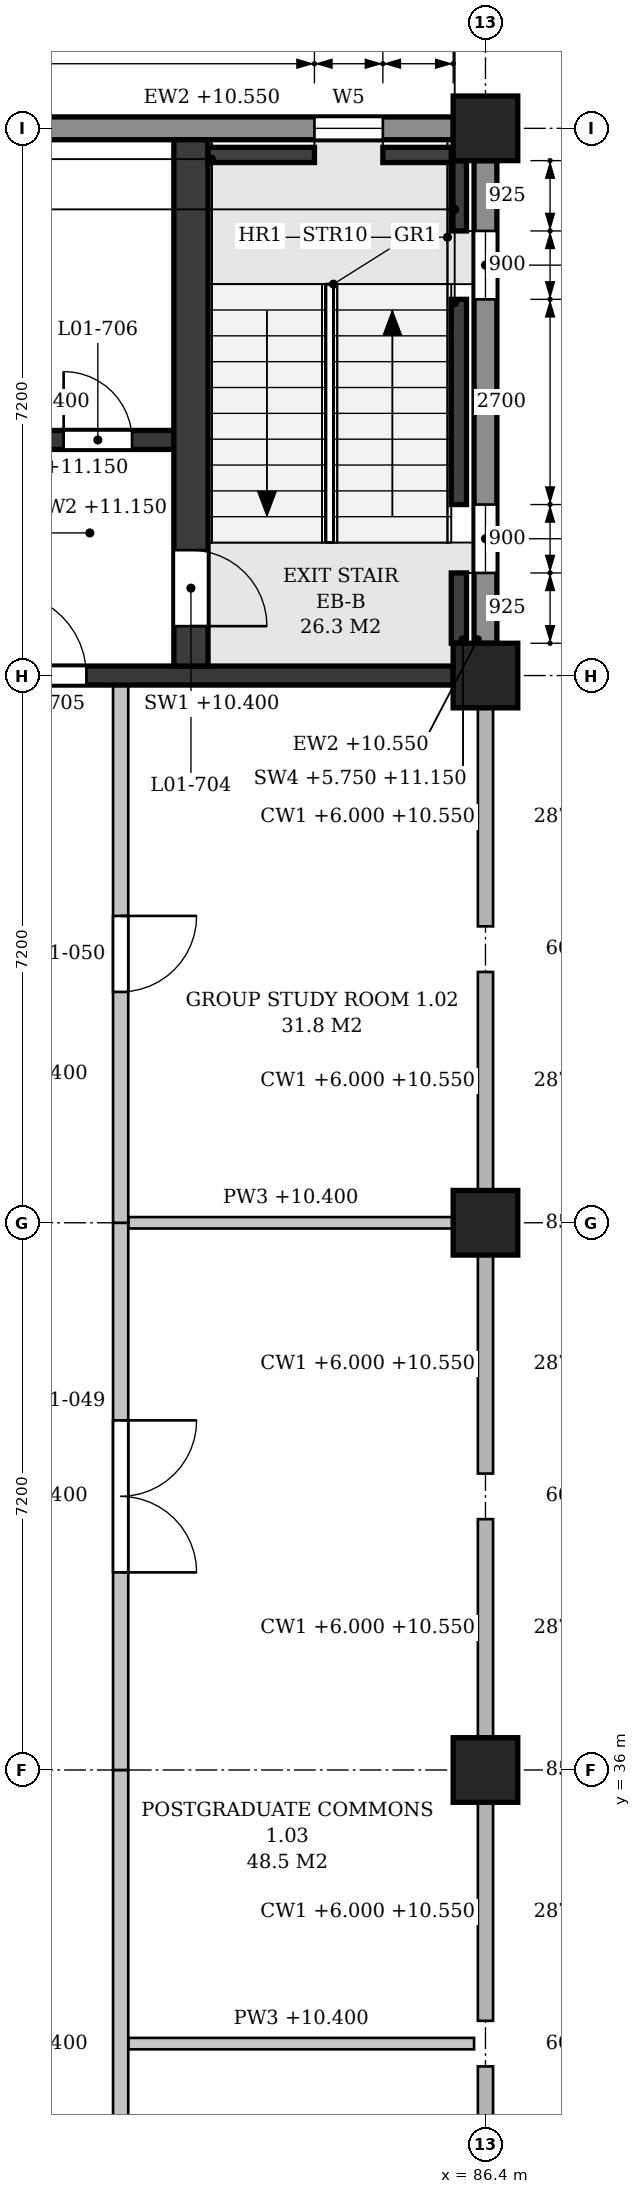
"""IFC4 building model, lengths in metres.
Left out: names, types, materials, properties, quantities, classifications, styles, units other than length and angle.
Written with IfcOpenShell. Run it as: python <this file> out.ifc"""

import sys

from ifc_helpers import new_model, si_unit, direction, frame, frame_2d, origin, origin_2d, place, context, subcontext, project, spatial, polyline, rectangle, outline, extrude, element, fill, save


model = new_model("IFC4")
c1 = context("Model", 3, precision=1e-05, world=origin(), true_north=direction((0.0, 1.0)))
c2 = subcontext(c1, "Body", "Model", "MODEL_VIEW")
j1 = project(units=[si_unit("LENGTHUNIT", "METRE"), si_unit("PLANEANGLEUNIT", "RADIAN")], contexts=[c1])
p1 = place(None, origin())
s1 = spatial("IfcSite", under=j1, at=p1, CompositionType="ELEMENT")
p2 = place(p1, origin())
s2 = spatial("IfcBuilding", under=s1, at=p2, CompositionType="ELEMENT")
p3 = place(p2, frame((0.0, 0.0, 6.0)))
s3 = spatial("IfcBuildingStorey", under=s2, at=p3, CompositionType="ELEMENT", Elevation=6.0)
for number, where, z_axis, x_axis in (
    (1, (86.4, 36.0, 0.0), (0.0, 0.0, 1.0), (1.0, 0.0, 0.0)),
    (2, (86.4, 43.2, 0.0), (0.0, 0.0, 1.0), (1.0, 0.0, 0.0)),
    (3, (86.4, 50.4, 0.0), (0.0, 0.0, 1.0), (1.0, 0.0, 0.0)),
    (4, (86.4, 57.6, 0.0), (0.0, 0.0, 1.0), (1.0, 0.0, 0.0)),
):
    element("IfcColumn", number, at=place(p3, frame(where, z_axis=z_axis, x_axis=x_axis)), inside=s3, PredefinedType="COLUMN", context=c2, shape_type="SweptSolid", body=[
        extrude(rectangle(XDim=0.85, YDim=0.85, at=origin_2d()), origin(), (0.0, 0.0, 1.0), 5.4),
    ])
p4 = place(p3, frame((86.4, 50.825, 0.0), z_axis=(0.0, 0.0, 1.0), x_axis=(0.0, 1.0, 0.0)))
e5 = element("IfcWall", 5, at=p4, inside=s3, PredefinedType="STANDARD", context=c2, shape_type="SweptSolid", body=[
    extrude(rectangle(XDim=6.35, YDim=0.3, at=frame_2d((3.175, 0.0))), origin(), (0.0, 0.0, 1.0), 4.55),
])
p5 = place(p4, frame((0.925, 0.0, 0.9)))
e6 = element("IfcOpeningElement", 6, at=p5, cuts=e5, PredefinedType="OPENING", context=c2, shape_type="SweptSolid", body=[
    extrude(outline(polyline([(0.0, 0.0), (0.9, 0.0), (0.9, 3.15), (0.45, 3.6), (0.0, 3.15), (0.0, 0.0)])), frame((0.0, 0.16, 0.0), z_axis=(0.0, -1.0, 0.0), x_axis=(1.0, 0.0, 0.0)), (0.0, 0.0, 1.0), 0.32),
])
p6 = place(p4, frame((4.525, 0.0, 0.9)))
e7 = element("IfcOpeningElement", 7, at=p6, cuts=e5, PredefinedType="OPENING", context=c2, shape_type="SweptSolid", body=[
    extrude(outline(polyline([(0.0, 0.0), (0.9, 0.0), (0.9, 3.15), (0.45, 3.6), (0.0, 3.15), (0.0, 0.0)])), frame((0.0, 0.16, 0.0), z_axis=(0.0, -1.0, 0.0), x_axis=(1.0, 0.0, 0.0)), (0.0, 0.0, 1.0), 0.32),
])
p7 = place(p3, frame((85.975, 57.6, 0.0), z_axis=(0.0, 0.0, 1.0), x_axis=(-1.0, 0.0, 0.0)))
e8 = element("IfcWall", 8, at=p7, inside=s3, PredefinedType="STANDARD", context=c2, shape_type="SweptSolid", body=[
    extrude(rectangle(XDim=6.35, YDim=0.3, at=frame_2d((3.175, 0.0))), origin(), (0.0, 0.0, 1.0), 4.55),
])
p8 = place(p7, frame((0.925, 0.0, 0.9)))
e9 = element("IfcOpeningElement", 9, at=p8, cuts=e8, PredefinedType="OPENING", context=c2, shape_type="SweptSolid", body=[
    extrude(outline(polyline([(0.0, 0.0), (0.9, 0.0), (0.9, 3.15), (0.45, 3.6), (0.0, 3.15), (0.0, 0.0)])), frame((0.0, 0.16, 0.0), z_axis=(0.0, -1.0, 0.0), x_axis=(1.0, 0.0, 0.0)), (0.0, 0.0, 1.0), 0.32),
])
p9 = place(p3, frame((79.625, 50.4, 0.0), z_axis=(0.0, 0.0, 1.0), x_axis=(1.0, 0.0, 0.0)))
e10 = element("IfcWall", 10, at=p9, inside=s3, PredefinedType="SHEAR", context=c2, shape_type="SweptSolid", body=[
    extrude(rectangle(XDim=6.35, YDim=0.25, at=frame_2d((3.175, 0.0))), origin(), (0.0, 0.0, 1.0), 4.4),
])
p10 = place(p9, frame((0.425, 0.0, 0.0)))
e11 = element("IfcOpeningElement", 11, at=p10, cuts=e10, PredefinedType="OPENING", context=c2, shape_type="SweptSolid", body=[
    extrude(rectangle(XDim=1.1, YDim=2.1, at=frame_2d((0.55, 1.05))), frame((0.0, 0.135, 0.0), z_axis=(0.0, -1.0, 0.0), x_axis=(1.0, 0.0, 0.0)), (0.0, 0.0, 1.0), 0.27),
])
p11 = place(p3, frame((86.05, 50.825, -0.25), z_axis=(0.0, 0.0, 1.0), x_axis=(0.0, 1.0, 0.0)))
e12 = element("IfcWall", 12, at=p11, inside=s3, PredefinedType="SHEAR", context=c2, shape_type="SweptSolid", body=[
    extrude(rectangle(XDim=0.925, YDim=0.2, at=frame_2d((0.462, 0.0))), origin(), (0.0, 0.0, 1.0), 5.4),
])
p12 = place(p3, frame((86.05, 52.65, -0.25), z_axis=(0.0, 0.0, 1.0), x_axis=(0.0, 1.0, 0.0)))
e13 = element("IfcWall", 13, at=p12, inside=s3, PredefinedType="SHEAR", context=c2, shape_type="SweptSolid", body=[
    extrude(rectangle(XDim=2.7, YDim=0.2, at=frame_2d((1.35, 0.0))), origin(), (0.0, 0.0, 1.0), 5.4),
])
p13 = place(p3, frame((86.05, 56.25, -0.25), z_axis=(0.0, 0.0, 1.0), x_axis=(0.0, 1.0, 0.0)))
e14 = element("IfcWall", 14, at=p13, inside=s3, PredefinedType="SHEAR", context=c2, shape_type="SweptSolid", body=[
    extrude(rectangle(XDim=0.925, YDim=0.2, at=frame_2d((0.462, 0.0))), origin(), (0.0, 0.0, 1.0), 5.4),
])
p14 = place(p3, frame((82.75, 57.25, -0.25), z_axis=(0.0, 0.0, 1.0), x_axis=(1.0, 0.0, 0.0)))
e15 = element("IfcWall", 15, at=p14, inside=s3, PredefinedType="SHEAR", context=c2, shape_type="SweptSolid", body=[
    extrude(rectangle(XDim=1.4, YDim=0.2, at=frame_2d((0.7, 0.0))), origin(), (0.0, 0.0, 1.0), 5.4),
])
p15 = place(p3, frame((85.05, 57.25, -0.25), z_axis=(0.0, 0.0, 1.0), x_axis=(1.0, 0.0, 0.0)))
e16 = element("IfcWall", 16, at=p15, inside=s3, PredefinedType="SHEAR", context=c2, shape_type="SweptSolid", body=[
    extrude(rectangle(XDim=0.9, YDim=0.2, at=frame_2d((0.45, 0.0))), origin(), (0.0, 0.0, 1.0), 5.4),
])
p16 = place(p3, frame((82.525, 50.525, 0.0), z_axis=(0.0, 0.0, 1.0), x_axis=(0.0, 1.0, 0.0)))
e17 = element("IfcWall", 17, at=p16, inside=s3, PredefinedType="SHEAR", context=c2, shape_type="SweptSolid", body=[
    extrude(rectangle(XDim=6.925, YDim=0.45, at=frame_2d((3.462, 0.0))), origin(), (0.0, 0.0, 1.0), 5.15),
])
p17 = place(p16, frame((0.525, 0.0, 0.0)))
e18 = element("IfcOpeningElement", 18, at=p17, cuts=e17, PredefinedType="OPENING", context=c2, shape_type="SweptSolid", body=[
    extrude(rectangle(XDim=1.0, YDim=2.1, at=frame_2d((0.5, 1.05))), frame((0.0, 0.235, 0.0), z_axis=(0.0, -1.0, 0.0), x_axis=(1.0, 0.0, 0.0)), (0.0, 0.0, 1.0), 0.47),
])
p18 = place(p3, frame((79.325, 53.5, 0.0), z_axis=(0.0, 0.0, 1.0), x_axis=(1.0, 0.0, 0.0)))
e19 = element("IfcWall", 19, at=p18, inside=s3, PredefinedType="SHEAR", context=c2, shape_type="SweptSolid", body=[
    extrude(rectangle(XDim=2.975, YDim=0.25, at=frame_2d((1.488, 0.0))), origin(), (0.0, 0.0, 1.0), 5.15),
])
p19 = place(p18, frame((1.525, 0.0, 0.0)))
e20 = element("IfcOpeningElement", 20, at=p19, cuts=e19, PredefinedType="OPENING", context=c2, shape_type="SweptSolid", body=[
    extrude(rectangle(XDim=0.9, YDim=2.1, at=frame_2d((0.45, 1.05))), frame((0.0, 0.135, 0.0), z_axis=(0.0, -1.0, 0.0), x_axis=(1.0, 0.0, 0.0)), (0.0, 0.0, 1.0), 0.27),
])
p20 = place(p3, frame((81.7, 32.4, 0.0), z_axis=(0.0, 0.0, 1.0), x_axis=(1.0, 0.0, 0.0)))
e21 = element("IfcWall", 21, at=p20, inside=s3, PredefinedType="PARTITIONING", context=c2, shape_type="SweptSolid", body=[
    extrude(rectangle(XDim=4.55, YDim=0.15, at=frame_2d((2.275, 0.0))), origin(), (0.0, 0.0, 1.0), 4.4),
])
p21 = place(p3, frame((81.7, 43.2, 0.0), z_axis=(0.0, 0.0, 1.0), x_axis=(1.0, 0.0, 0.0)))
e22 = element("IfcWall", 22, at=p21, inside=s3, PredefinedType="PARTITIONING", context=c2, shape_type="SweptSolid", body=[
    extrude(rectangle(XDim=4.275, YDim=0.15, at=frame_2d((2.138, 0.0))), origin(), (0.0, 0.0, 1.0), 4.4),
])
p22 = place(p3, frame((81.6, 28.8, 0.0), z_axis=(0.0, 0.0, 1.0), x_axis=(0.0, 1.0, 0.0)))
e23 = element("IfcWall", 23, at=p22, inside=s3, PredefinedType="PARTITIONING", context=c2, shape_type="SweptSolid", body=[
    extrude(outline(polyline([(0.0, 0.0), (7.2, 0.0), (7.2, 4.4), (6.95, 4.4), (6.95, 5.15), (0.25, 5.15), (0.25, 4.4), (0.0, 4.4), (0.0, 0.0)])), frame((0.0, 0.1, 0.0), z_axis=(0.0, -1.0, 0.0), x_axis=(1.0, 0.0, 0.0)), (0.0, 0.0, 1.0), 0.2),
])
p23 = place(p3, frame((81.6, 36.0, 0.0), z_axis=(0.0, 0.0, 1.0), x_axis=(0.0, 1.0, 0.0)))
e24 = element("IfcWall", 24, at=p23, inside=s3, PredefinedType="PARTITIONING", context=c2, shape_type="SweptSolid", body=[
    extrude(outline(polyline([(0.0, 0.0), (7.2, 0.0), (7.2, 4.4), (6.95, 4.4), (6.95, 5.15), (0.25, 5.15), (0.25, 4.4), (0.0, 4.4), (0.0, 0.0)])), frame((0.0, 0.1, 0.0), z_axis=(0.0, -1.0, 0.0), x_axis=(1.0, 0.0, 0.0)), (0.0, 0.0, 1.0), 0.2),
])
p24 = place(p23, frame((2.6, 0.0, 0.0)))
e25 = element("IfcOpeningElement", 25, at=p24, cuts=e24, PredefinedType="OPENING", context=c2, shape_type="SweptSolid", body=[
    extrude(rectangle(XDim=2.0, YDim=2.1, at=frame_2d((1.0, 1.05))), frame((0.0, 0.11, 0.0), z_axis=(0.0, -1.0, 0.0), x_axis=(1.0, 0.0, 0.0)), (0.0, 0.0, 1.0), 0.22),
])
p25 = place(p3, frame((81.6, 43.2, 0.0), z_axis=(0.0, 0.0, 1.0), x_axis=(0.0, 1.0, 0.0)))
e26 = element("IfcWall", 26, at=p25, inside=s3, PredefinedType="PARTITIONING", context=c2, shape_type="SweptSolid", body=[
    extrude(outline(polyline([(0.0, 0.0), (7.075, 0.0), (7.075, 4.4), (6.95, 4.4), (6.95, 5.15), (0.25, 5.15), (0.25, 4.4), (0.0, 4.4), (0.0, 0.0)])), frame((0.0, 0.1, 0.0), z_axis=(0.0, -1.0, 0.0), x_axis=(1.0, 0.0, 0.0)), (0.0, 0.0, 1.0), 0.2),
])
p26 = place(p25, frame((3.038, 0.0, 0.0)))
e27 = element("IfcOpeningElement", 27, at=p26, cuts=e26, PredefinedType="OPENING", context=c2, shape_type="SweptSolid", body=[
    extrude(rectangle(XDim=1.0, YDim=2.1, at=frame_2d((0.5, 1.05))), frame((0.0, 0.11, 0.0), z_axis=(0.0, -1.0, 0.0), x_axis=(1.0, 0.0, 0.0)), (0.0, 0.0, 1.0), 0.22),
])
p27 = place(p5, origin())
e28 = element("IfcWindow", 28, at=p27, inside=s3, PartitioningType="SINGLE_PANEL", PredefinedType="WINDOW", context=c2, shape_type="SweptSolid", body=[
    extrude(outline(polyline([(0.0, 0.0), (0.9, 0.0), (0.9, 3.15), (0.45, 3.6), (0.0, 3.15), (0.0, 0.0)])), frame((0.0, 0.03, 0.0), z_axis=(0.0, -1.0, 0.0), x_axis=(1.0, 0.0, 0.0)), (0.0, 0.0, 1.0), 0.06),
])
fill(e6, e28)
p28 = place(p6, origin())
e29 = element("IfcWindow", 29, at=p28, inside=s3, PartitioningType="SINGLE_PANEL", PredefinedType="WINDOW", context=c2, shape_type="SweptSolid", body=[
    extrude(outline(polyline([(0.0, 0.0), (0.9, 0.0), (0.9, 3.15), (0.45, 3.6), (0.0, 3.15), (0.0, 0.0)])), frame((0.0, 0.03, 0.0), z_axis=(0.0, -1.0, 0.0), x_axis=(1.0, 0.0, 0.0)), (0.0, 0.0, 1.0), 0.06),
])
fill(e7, e29)
p29 = place(p8, origin())
e30 = element("IfcWindow", 30, at=p29, inside=s3, PartitioningType="SINGLE_PANEL", PredefinedType="WINDOW", context=c2, shape_type="SweptSolid", body=[
    extrude(outline(polyline([(0.0, 0.0), (0.9, 0.0), (0.9, 3.15), (0.45, 3.6), (0.0, 3.15), (0.0, 0.0)])), frame((0.0, 0.03, 0.0), z_axis=(0.0, -1.0, 0.0), x_axis=(1.0, 0.0, 0.0)), (0.0, 0.0, 1.0), 0.06),
])
fill(e9, e30)
p30 = place(p17, frame((1.0, 0.0, 0.0), z_axis=(0.0, 0.0, 1.0), x_axis=(-1.0, 0.0, 0.0)))
e31 = element("IfcDoor", 31, at=p30, inside=s3, OperationType="SINGLE_SWING_RIGHT", PredefinedType="DOOR", context=c2, shape_type="SweptSolid", body=[
    extrude(rectangle(XDim=1.0, YDim=2.1, at=frame_2d((0.5, 1.05))), frame((0.0, 0.025, 0.0), z_axis=(0.0, -1.0, 0.0), x_axis=(1.0, 0.0, 0.0)), (0.0, 0.0, 1.0), 0.05),
])
fill(e18, e31)
p31 = place(p10, origin())
e32 = element("IfcDoor", 32, at=p31, inside=s3, OperationType="SINGLE_SWING_LEFT", PredefinedType="DOOR", context=c2, shape_type="SweptSolid", body=[
    extrude(rectangle(XDim=1.1, YDim=2.1, at=frame_2d((0.55, 1.05))), frame((0.0, 0.025, 0.0), z_axis=(0.0, -1.0, 0.0), x_axis=(1.0, 0.0, 0.0)), (0.0, 0.0, 1.0), 0.05),
])
fill(e11, e32)
p32 = place(p19, origin())
e33 = element("IfcDoor", 33, at=p32, inside=s3, OperationType="SINGLE_SWING_LEFT", PredefinedType="DOOR", context=c2, shape_type="SweptSolid", body=[
    extrude(rectangle(XDim=0.9, YDim=2.1, at=frame_2d((0.45, 1.05))), frame((0.0, 0.025, 0.0), z_axis=(0.0, -1.0, 0.0), x_axis=(1.0, 0.0, 0.0)), (0.0, 0.0, 1.0), 0.05),
])
fill(e20, e33)
p33 = place(p24, origin())
e34 = element("IfcDoor", 34, at=p33, inside=s3, OperationType="DOUBLE_DOOR_SINGLE_SWING", PredefinedType="DOOR", context=c2, shape_type="SweptSolid", body=[
    extrude(rectangle(XDim=2.0, YDim=2.1, at=frame_2d((1.0, 1.05))), frame((0.0, 0.025, 0.0), z_axis=(0.0, -1.0, 0.0), x_axis=(1.0, 0.0, 0.0)), (0.0, 0.0, 1.0), 0.05),
])
fill(e25, e34)
p34 = place(p26, frame((1.0, 0.0, 0.0), z_axis=(0.0, 0.0, 1.0), x_axis=(-1.0, 0.0, 0.0)))
e35 = element("IfcDoor", 35, at=p34, inside=s3, OperationType="SINGLE_SWING_LEFT", PredefinedType="DOOR", context=c2, shape_type="SweptSolid", body=[
    extrude(rectangle(XDim=1.0, YDim=2.1, at=frame_2d((0.5, 1.05))), frame((0.0, 0.025, 0.0), z_axis=(0.0, -1.0, 0.0), x_axis=(1.0, 0.0, 0.0)), (0.0, 0.0, 1.0), 0.05),
])
fill(e27, e35)
save(model, sys.argv[1])
